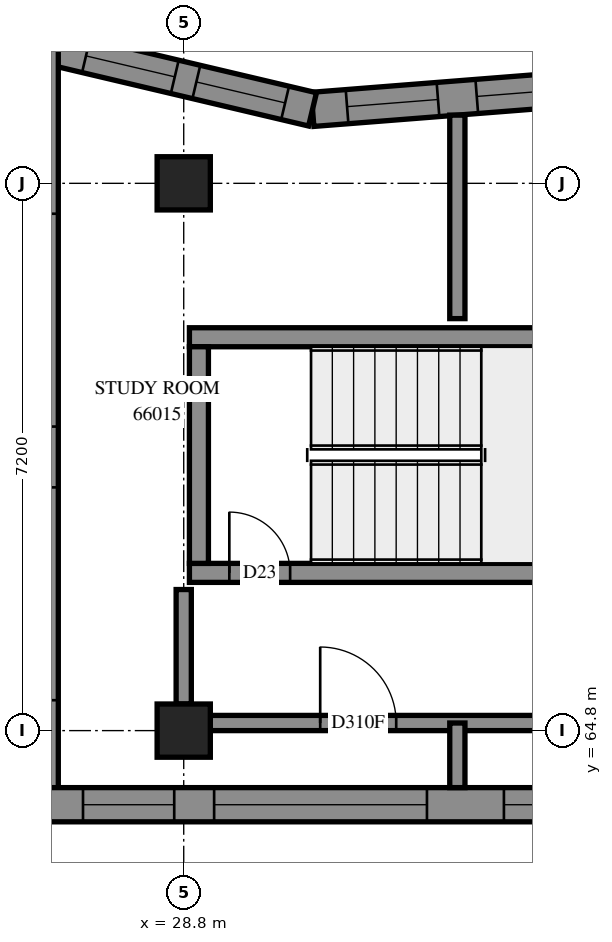
"""IFC4 building model, lengths in metres.
Left out: names, types, materials, properties, quantities, classifications, styles, units other than length and angle.
Written with IfcOpenShell. Run it as: python <this file> out.ifc"""

import sys

from ifc_helpers import new_model, si_unit, direction, frame, frame_2d, origin, origin_2d, place, context, subcontext, project, spatial, polyline, rectangle, outline, extrude, element, fill, save


model = new_model("IFC4")
c1 = context("Model", 3, precision=1e-05, world=origin(), true_north=direction((0.0, 1.0)))
c2 = subcontext(c1, "Body", "Model", "MODEL_VIEW")
j1 = project(units=[si_unit("LENGTHUNIT", "METRE"), si_unit("PLANEANGLEUNIT", "RADIAN")], contexts=[c1])
p1 = place(None, origin())
s1 = spatial("IfcSite", under=j1, at=p1, CompositionType="ELEMENT")
p2 = place(p1, origin())
s2 = spatial("IfcBuilding", under=s1, at=p2, CompositionType="ELEMENT")
p3 = place(p2, frame((0.0, 0.0, 243.8)))
s3 = spatial("IfcBuildingStorey", under=s2, at=p3, CompositionType="ELEMENT", Elevation=243.8)
for number, where, z_axis, x_axis in (
    (1, (28.8, 64.8, 0.0), (0.0, 0.0, 1.0), (1.0, 0.0, 0.0)),
    (2, (28.8, 72.0, 0.0), (0.0, 0.0, 1.0), (1.0, 0.0, 0.0)),
):
    element("IfcColumn", number, at=place(p3, frame(where, z_axis=z_axis, x_axis=x_axis)), inside=s3, PredefinedType="COLUMN", context=c2, shape_type="SweptSolid", body=[
        extrude(rectangle(XDim=0.7, YDim=0.7, at=origin_2d()), origin(), (0.0, 0.0, 1.0), 3.1),
    ])
p4 = place(p3, frame((34.324, 73.274, 0.0), z_axis=(0.0, 0.0, 1.0), x_axis=(-0.9969172534, -0.078460116, 0.0)))
e3 = element("IfcWall", 3, at=p4, inside=s3, PredefinedType="SOLIDWALL", context=c2, shape_type="SweptSolid", body=[
    extrude(outline(polyline([(-0.018, -0.225), (3.806, -0.225), (3.877, 0.225), (0.018, 0.225), (-0.018, -0.225)])), origin(), (0.0, 0.0, 1.0), 3.1),
])
p5 = place(p4, frame((0.474, 0.0, 0.45)))
e4 = element("IfcOpeningElement", 4, at=p5, cuts=e3, PredefinedType="OPENING", context=c2, shape_type="SweptSolid", body=[
    extrude(rectangle(XDim=1.2, YDim=2.55, at=frame_2d((0.6, 1.275))), frame((0.0, 0.235, 0.0), z_axis=(0.0, -1.0, 0.0), x_axis=(1.0, 0.0, 0.0)), (0.0, 0.0, 1.0), 0.47),
])
p6 = place(p4, frame((2.186, 0.0, 0.45)))
e5 = element("IfcOpeningElement", 5, at=p6, cuts=e3, PredefinedType="OPENING", context=c2, shape_type="SweptSolid", body=[
    extrude(rectangle(XDim=1.2, YDim=2.55, at=frame_2d((0.6, 1.275))), frame((0.0, 0.235, 0.0), z_axis=(0.0, -1.0, 0.0), x_axis=(1.0, 0.0, 0.0)), (0.0, 0.0, 1.0), 0.47),
])
p7 = place(p3, frame((30.495, 72.973, 0.0), z_axis=(0.0, 0.0, 1.0), x_axis=(-0.9732423964, 0.2297808476, 0.0)))
e6 = element("IfcWall", 6, at=p7, inside=s3, PredefinedType="SOLIDWALL", context=c2, shape_type="SweptSolid", body=[
    extrude(outline(polyline([(0.035, -0.225), (3.952, -0.225), (3.384, 0.225), (-0.035, 0.225), (0.035, -0.225)])), origin(), (0.0, 0.0, 1.0), 3.1),
])
p8 = place(p7, frame((0.371, 0.0, 0.45)))
e7 = element("IfcOpeningElement", 7, at=p8, cuts=e6, PredefinedType="OPENING", context=c2, shape_type="SweptSolid", body=[
    extrude(rectangle(XDim=1.2, YDim=2.55, at=frame_2d((0.6, 1.275))), frame((0.0, 0.235, 0.0), z_axis=(0.0, -1.0, 0.0), x_axis=(1.0, 0.0, 0.0)), (0.0, 0.0, 1.0), 0.47),
])
p9 = place(p7, frame((1.862, 0.0, 0.45)))
e8 = element("IfcOpeningElement", 8, at=p9, cuts=e6, PredefinedType="OPENING", context=c2, shape_type="SweptSolid", body=[
    extrude(rectangle(XDim=1.2, YDim=2.55, at=frame_2d((0.6, 1.275))), frame((0.0, 0.235, 0.0), z_axis=(0.0, -1.0, 0.0), x_axis=(1.0, 0.0, 0.0)), (0.0, 0.0, 1.0), 0.47),
])
p10 = place(p3, frame((26.925, 73.816, 0.0), z_axis=(0.0, 0.0, 1.0), x_axis=(0.0, -1.0, 0.0)))
e9 = element("IfcWall", 9, at=p10, inside=s3, PredefinedType="SOLIDWALL", context=c2, shape_type="SweptSolid", body=[
    extrude(outline(polyline([(-0.284, -0.225), (10.216, -0.225), (9.766, 0.225), (0.284, 0.225), (-0.284, -0.225)])), origin(), (0.0, 0.0, 1.0), 3.1),
])
p11 = place(p10, frame((2.216, 0.0, 0.45)))
e10 = element("IfcOpeningElement", 10, at=p11, cuts=e9, PredefinedType="OPENING", context=c2, shape_type="SweptSolid", body=[
    extrude(rectangle(XDim=2.8, YDim=2.55, at=frame_2d((1.4, 1.275))), frame((0.0, 0.235, 0.0), z_axis=(0.0, -1.0, 0.0), x_axis=(1.0, 0.0, 0.0)), (0.0, 0.0, 1.0), 0.47),
])
p12 = place(p10, frame((5.816, 0.0, 0.45)))
e11 = element("IfcOpeningElement", 11, at=p12, cuts=e9, PredefinedType="OPENING", context=c2, shape_type="SweptSolid", body=[
    extrude(rectangle(XDim=2.8, YDim=2.55, at=frame_2d((1.4, 1.275))), frame((0.0, 0.235, 0.0), z_axis=(0.0, -1.0, 0.0), x_axis=(1.0, 0.0, 0.0)), (0.0, 0.0, 1.0), 0.47),
])
p13 = place(p3, frame((26.925, 63.825, 0.0), z_axis=(0.0, 0.0, 1.0), x_axis=(1.0, 0.0, 0.0)))
e12 = element("IfcWall", 12, at=p13, inside=s3, PredefinedType="SOLIDWALL", context=c2, shape_type="SweptSolid", body=[
    extrude(outline(polyline([(-0.225, -0.225), (7.875, -0.225), (8.325, 0.225), (0.225, 0.225), (-0.225, -0.225)])), origin(), (0.0, 0.0, 1.0), 3.1),
])
p14 = place(p13, frame((2.275, 0.0, 0.45)))
e13 = element("IfcOpeningElement", 13, at=p14, cuts=e12, PredefinedType="OPENING", context=c2, shape_type="SweptSolid", body=[
    extrude(rectangle(XDim=2.8, YDim=2.55, at=frame_2d((1.4, 1.275))), frame((0.0, 0.235, 0.0), z_axis=(0.0, -1.0, 0.0), x_axis=(1.0, 0.0, 0.0)), (0.0, 0.0, 1.0), 0.47),
])
p15 = place(p13, frame((0.55, 0.0, 0.45)))
e14 = element("IfcOpeningElement", 14, at=p15, cuts=e12, PredefinedType="OPENING", context=c2, shape_type="SweptSolid", body=[
    extrude(rectangle(XDim=1.2, YDim=2.55, at=frame_2d((0.6, 1.275))), frame((0.0, 0.235, 0.0), z_axis=(0.0, -1.0, 0.0), x_axis=(1.0, 0.0, 0.0)), (0.0, 0.0, 1.0), 0.47),
])
p16 = place(p13, frame((6.088, 0.0, 0.45)))
e15 = element("IfcOpeningElement", 15, at=p16, cuts=e12, PredefinedType="OPENING", context=c2, shape_type="SweptSolid", body=[
    extrude(rectangle(XDim=1.2, YDim=2.55, at=frame_2d((0.6, 1.275))), frame((0.0, 0.235, 0.0), z_axis=(0.0, -1.0, 0.0), x_axis=(1.0, 0.0, 0.0)), (0.0, 0.0, 1.0), 0.47),
])
p17 = place(p3, frame((28.875, 66.875, -0.3), z_axis=(0.0, 0.0, 1.0), x_axis=(1.0, 0.0, 0.0)))
e16 = element("IfcWall", 16, at=p17, inside=s3, PredefinedType="SOLIDWALL", context=c2, shape_type="SweptSolid", body=[
    extrude(rectangle(XDim=6.25, YDim=0.25, at=frame_2d((3.125, 0.0))), origin(), (0.0, 0.0, 1.0), 3.4),
])
p18 = place(p17, frame((0.525, 0.0, 0.3)))
e17 = element("IfcOpeningElement", 17, at=p18, cuts=e16, PredefinedType="OPENING", context=c2, shape_type="SweptSolid", body=[
    extrude(rectangle(XDim=0.8, YDim=2.1, at=frame_2d((0.4, 1.05))), frame((0.0, 0.135, 0.0), z_axis=(0.0, -1.0, 0.0), x_axis=(1.0, 0.0, 0.0)), (0.0, 0.0, 1.0), 0.27),
])
p19 = place(p3, frame((28.875, 69.975, -0.3), z_axis=(0.0, 0.0, 1.0), x_axis=(1.0, 0.0, 0.0)))
e18 = element("IfcWall", 18, at=p19, inside=s3, PredefinedType="SOLIDWALL", context=c2, shape_type="SweptSolid", body=[
    extrude(rectangle(XDim=6.25, YDim=0.25, at=frame_2d((3.125, 0.0))), origin(), (0.0, 0.0, 1.0), 3.4),
])
p20 = place(p3, frame((29.0, 67.0, -0.3), z_axis=(0.0, 0.0, 1.0), x_axis=(0.0, 1.0, 0.0)))
e19 = element("IfcWall", 19, at=p20, inside=s3, PredefinedType="SOLIDWALL", context=c2, shape_type="SweptSolid", body=[
    extrude(rectangle(XDim=2.85, YDim=0.25, at=frame_2d((1.425, 0.0))), origin(), (0.0, 0.0, 1.0), 3.4),
])
p21 = place(p3, frame((29.15, 64.9, 0.0), z_axis=(0.0, 0.0, 1.0), x_axis=(1.0, 0.0, 0.0)))
e20 = element("IfcWall", 20, at=p21, inside=s3, PredefinedType="PARTITIONING", context=c2, shape_type="SweptSolid", body=[
    extrude(rectangle(XDim=6.35, YDim=0.2, at=frame_2d((3.175, 0.0))), origin(), (0.0, 0.0, 1.0), 2.6),
])
p22 = place(p21, frame((1.446, 0.0, 0.0)))
e21 = element("IfcOpeningElement", 21, at=p22, cuts=e20, PredefinedType="OPENING", context=c2, shape_type="SweptSolid", body=[
    extrude(rectangle(XDim=1.0, YDim=2.1, at=frame_2d((0.5, 1.05))), frame((0.0, 0.11, 0.0), z_axis=(0.0, -1.0, 0.0), x_axis=(1.0, 0.0, 0.0)), (0.0, 0.0, 1.0), 0.22),
])
p23 = place(p3, frame((32.4, 70.22, 0.0), z_axis=(0.0, 0.0, 1.0), x_axis=(0.0, 1.0, 0.0)))
e22 = element("IfcWall", 22, at=p23, inside=s3, PredefinedType="PARTITIONING", context=c2, shape_type="SweptSolid", body=[
    extrude(rectangle(XDim=2.677, YDim=0.2, at=frame_2d((1.339, 0.0))), origin(), (0.0, 0.0, 1.0), 3.1),
])
p24 = place(p3, frame((28.8, 65.15, 0.0), z_axis=(0.0, 0.0, 1.0), x_axis=(0.0, 1.0, 0.0)))
e23 = element("IfcWall", 23, at=p24, inside=s3, PredefinedType="PARTITIONING", context=c2, shape_type="SweptSolid", body=[
    extrude(rectangle(XDim=1.506, YDim=0.2, at=frame_2d((0.753, 0.0))), origin(), (0.0, 0.0, 1.0), 2.6),
])
p25 = place(p3, frame((32.4, 64.05, 0.0), z_axis=(0.0, 0.0, 1.0), x_axis=(0.0, 1.0, 0.0)))
e24 = element("IfcWall", 24, at=p25, inside=s3, PredefinedType="PARTITIONING", context=c2, shape_type="SweptSolid", body=[
    extrude(rectangle(XDim=0.85, YDim=0.2, at=frame_2d((0.425, 0.0))), origin(), (0.0, 0.0, 1.0), 3.1),
])
p26 = place(p5, origin())
e25 = element("IfcWindow", 25, at=p26, inside=s3, PartitioningType="SINGLE_PANEL", PredefinedType="WINDOW", context=c2, shape_type="SweptSolid", body=[
    extrude(rectangle(XDim=1.2, YDim=2.55, at=frame_2d((0.6, 1.275))), frame((0.0, 0.205, 0.0), z_axis=(0.0, -1.0, 0.0), x_axis=(1.0, 0.0, 0.0)), (0.0, 0.0, 1.0), 0.06),
])
fill(e4, e25)
p27 = place(p6, origin())
e26 = element("IfcWindow", 26, at=p27, inside=s3, PartitioningType="SINGLE_PANEL", PredefinedType="WINDOW", context=c2, shape_type="SweptSolid", body=[
    extrude(rectangle(XDim=1.2, YDim=2.55, at=frame_2d((0.6, 1.275))), frame((0.0, 0.205, 0.0), z_axis=(0.0, -1.0, 0.0), x_axis=(1.0, 0.0, 0.0)), (0.0, 0.0, 1.0), 0.06),
])
fill(e5, e26)
p28 = place(p8, origin())
e27 = element("IfcWindow", 27, at=p28, inside=s3, PartitioningType="SINGLE_PANEL", PredefinedType="WINDOW", context=c2, shape_type="SweptSolid", body=[
    extrude(rectangle(XDim=1.2, YDim=2.55, at=frame_2d((0.6, 1.275))), frame((0.0, 0.205, 0.0), z_axis=(0.0, -1.0, 0.0), x_axis=(1.0, 0.0, 0.0)), (0.0, 0.0, 1.0), 0.06),
])
fill(e7, e27)
p29 = place(p9, origin())
e28 = element("IfcWindow", 28, at=p29, inside=s3, PartitioningType="SINGLE_PANEL", PredefinedType="WINDOW", context=c2, shape_type="SweptSolid", body=[
    extrude(rectangle(XDim=1.2, YDim=2.55, at=frame_2d((0.6, 1.275))), frame((0.0, 0.205, 0.0), z_axis=(0.0, -1.0, 0.0), x_axis=(1.0, 0.0, 0.0)), (0.0, 0.0, 1.0), 0.06),
])
fill(e8, e28)
p30 = place(p11, origin())
e29 = element("IfcWindow", 29, at=p30, inside=s3, PartitioningType="SINGLE_PANEL", PredefinedType="WINDOW", context=c2, shape_type="SweptSolid", body=[
    extrude(rectangle(XDim=2.8, YDim=2.55, at=frame_2d((1.4, 1.275))), frame((0.0, 0.205, 0.0), z_axis=(0.0, -1.0, 0.0), x_axis=(1.0, 0.0, 0.0)), (0.0, 0.0, 1.0), 0.06),
])
fill(e10, e29)
p31 = place(p12, origin())
e30 = element("IfcWindow", 30, at=p31, inside=s3, PartitioningType="SINGLE_PANEL", PredefinedType="WINDOW", context=c2, shape_type="SweptSolid", body=[
    extrude(rectangle(XDim=2.8, YDim=2.55, at=frame_2d((1.4, 1.275))), frame((0.0, 0.205, 0.0), z_axis=(0.0, -1.0, 0.0), x_axis=(1.0, 0.0, 0.0)), (0.0, 0.0, 1.0), 0.06),
])
fill(e11, e30)
p32 = place(p14, origin())
e31 = element("IfcWindow", 31, at=p32, inside=s3, PartitioningType="SINGLE_PANEL", PredefinedType="WINDOW", context=c2, shape_type="SweptSolid", body=[
    extrude(rectangle(XDim=2.8, YDim=2.55, at=frame_2d((1.4, 1.275))), frame((0.0, 0.205, 0.0), z_axis=(0.0, -1.0, 0.0), x_axis=(1.0, 0.0, 0.0)), (0.0, 0.0, 1.0), 0.06),
])
fill(e13, e31)
p33 = place(p15, origin())
e32 = element("IfcWindow", 32, at=p33, inside=s3, PartitioningType="SINGLE_PANEL", PredefinedType="WINDOW", context=c2, shape_type="SweptSolid", body=[
    extrude(rectangle(XDim=1.2, YDim=2.55, at=frame_2d((0.6, 1.275))), frame((0.0, 0.205, 0.0), z_axis=(0.0, -1.0, 0.0), x_axis=(1.0, 0.0, 0.0)), (0.0, 0.0, 1.0), 0.06),
])
fill(e14, e32)
p34 = place(p16, origin())
e33 = element("IfcWindow", 33, at=p34, inside=s3, PartitioningType="SINGLE_PANEL", PredefinedType="WINDOW", context=c2, shape_type="SweptSolid", body=[
    extrude(rectangle(XDim=1.2, YDim=2.55, at=frame_2d((0.6, 1.275))), frame((0.0, 0.205, 0.0), z_axis=(0.0, -1.0, 0.0), x_axis=(1.0, 0.0, 0.0)), (0.0, 0.0, 1.0), 0.06),
])
fill(e15, e33)
p35 = place(p18, origin())
e34 = element("IfcDoor", 34, at=p35, inside=s3, OperationType="SINGLE_SWING_LEFT", PredefinedType="DOOR", context=c2, shape_type="SweptSolid", body=[
    extrude(rectangle(XDim=0.8, YDim=2.1, at=frame_2d((0.4, 1.05))), frame((0.0, 0.025, 0.0), z_axis=(0.0, -1.0, 0.0), x_axis=(1.0, 0.0, 0.0)), (0.0, 0.0, 1.0), 0.05),
])
fill(e17, e34)
p36 = place(p22, origin())
e35 = element("IfcDoor", 35, at=p36, inside=s3, OperationType="SINGLE_SWING_RIGHT", PredefinedType="DOOR", context=c2, shape_type="SweptSolid", body=[
    extrude(rectangle(XDim=1.0, YDim=2.1, at=frame_2d((0.5, 1.05))), frame((0.0, 0.025, 0.0), z_axis=(0.0, -1.0, 0.0), x_axis=(1.0, 0.0, 0.0)), (0.0, 0.0, 1.0), 0.05),
])
fill(e21, e35)
save(model, sys.argv[1])
